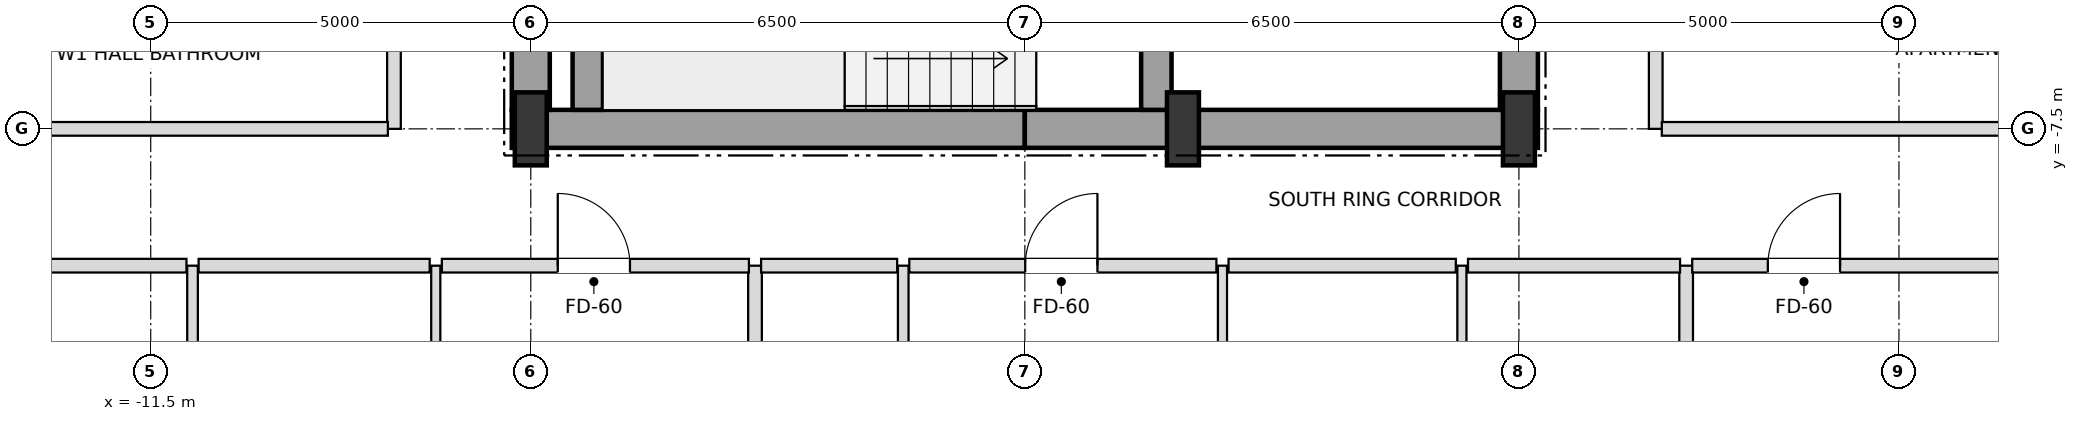
"""IFC4 building model, lengths in metres.
Left out: names, types, materials, properties, quantities, classifications, styles, units other than length and angle.
Written with IfcOpenShell. Run it as: python <this file> out.ifc"""

import sys

from ifc_helpers import new_model, si_unit, direction, frame, frame_2d, origin, origin_2d, place, context, subcontext, project, spatial, rectangle, i_section, extrude, element, fill, save


model = new_model("IFC4")
c1 = context("Model", 3, precision=1e-05, world=origin(), true_north=direction((0.0, 1.0)))
c2 = subcontext(c1, "Body", "Model", "MODEL_VIEW")
j1 = project(units=[si_unit("LENGTHUNIT", "METRE"), si_unit("PLANEANGLEUNIT", "RADIAN")], contexts=[c1])
p1 = place(None, origin())
s1 = spatial("IfcSite", under=j1, at=p1, CompositionType="ELEMENT")
p2 = place(p1, origin())
s2 = spatial("IfcBuilding", under=s1, at=p2, CompositionType="ELEMENT")
p3 = place(p2, frame((0.0, 0.0, 43.2)))
s3 = spatial("IfcBuildingStorey", under=s2, at=p3, CompositionType="ELEMENT", Elevation=43.2)
for number, where, z_axis, x_axis in (
    (1, (-6.5, -7.5, 0.0), (0.0, 0.0, 1.0), (1.0, 0.0, 0.0)),
    (2, (2.08, -7.5, 0.0), (0.0, 0.0, 1.0), (1.0, 0.0, 0.0)),
    (3, (6.5, -7.5, 0.0), (0.0, 0.0, 1.0), (1.0, 0.0, 0.0)),
):
    element("IfcColumn", number, at=place(p3, frame(where, z_axis=z_axis, x_axis=x_axis)), inside=s3, PredefinedType="COLUMN", context=c2, shape_type="SweptSolid", body=[
        extrude(i_section(OverallWidth=0.42, OverallDepth=0.96, WebThickness=0.022, FlangeThickness=0.034, at=origin_2d()), origin(), (0.0, 0.0, 1.0), 3.6),
    ])
for number, where, z_axis, x_axis in (
    (4, (-6.75, -7.5, 0.0), (0.0, 0.0, 1.0), (1.0, 0.0, 0.0)),
    (5, (0.0, -7.5, 0.0), (0.0, 0.0, 1.0), (1.0, 0.0, 0.0)),
):
    element("IfcWall", number, at=place(p3, frame(where, z_axis=z_axis, x_axis=x_axis)), inside=s3, PredefinedType="SHEAR", context=c2, shape_type="SweptSolid", body=[
        extrude(rectangle(XDim=6.75, YDim=0.5, at=frame_2d((3.375, 0.0))), origin(), (0.0, 0.0, 1.0), 3.38),
    ])
p4 = place(p3, frame((-6.5, -7.25, 0.0), z_axis=(0.0, 0.0, 1.0), x_axis=(0.0, 1.0, 0.0)))
e6 = element("IfcWall", 6, at=p4, inside=s3, PredefinedType="SHEAR", context=c2, shape_type="SweptSolid", body=[
    extrude(rectangle(XDim=3.55, YDim=0.5, at=frame_2d((1.775, 0.0))), origin(), (0.0, 0.0, 1.0), 3.38),
])
p5 = place(p3, frame((6.5, -7.25, 0.0), z_axis=(0.0, 0.0, 1.0), x_axis=(0.0, 1.0, 0.0)))
e7 = element("IfcWall", 7, at=p5, inside=s3, PredefinedType="SHEAR", context=c2, shape_type="SweptSolid", body=[
    extrude(rectangle(XDim=5.75, YDim=0.5, at=frame_2d((2.875, 0.0))), origin(), (0.0, 0.0, 1.0), 3.38),
])
p6 = place(p5, frame((0.85, 0.0, 0.0)))
e8 = element("IfcOpeningElement", 8, at=p6, cuts=e7, PredefinedType="OPENING", context=c2, shape_type="SweptSolid", body=[
    extrude(rectangle(XDim=1.05, YDim=2.15, at=frame_2d((0.525, 1.075))), frame((0.0, 0.26, 0.0), z_axis=(0.0, -1.0, 0.0), x_axis=(1.0, 0.0, 0.0)), (0.0, 0.0, 1.0), 0.52),
])
p7 = place(p3, frame((-5.75, -7.25, 0.0), z_axis=(0.0, 0.0, 1.0), x_axis=(0.0, 1.0, 0.0)))
e9 = element("IfcWall", 9, at=p7, inside=s3, PredefinedType="SHEAR", context=c2, shape_type="SweptSolid", body=[
    extrude(rectangle(XDim=2.9, YDim=0.4, at=frame_2d((1.45, 0.0))), origin(), (0.0, 0.0, 1.0), 3.38),
])
p8 = place(p3, frame((1.73, -7.25, 0.0), z_axis=(0.0, 0.0, 1.0), x_axis=(0.0, 1.0, 0.0)))
e10 = element("IfcWall", 10, at=p8, inside=s3, PredefinedType="SHEAR", context=c2, shape_type="SweptSolid", body=[
    extrude(rectangle(XDim=3.3, YDim=0.4, at=frame_2d((1.65, 0.0))), origin(), (0.0, 0.0, 1.0), 3.38),
])
p9 = place(p8, frame((0.9, 0.0, 0.0)))
e11 = element("IfcOpeningElement", 11, at=p9, cuts=e10, PredefinedType="OPENING", context=c2, shape_type="SweptSolid", body=[
    extrude(rectangle(XDim=1.05, YDim=2.15, at=frame_2d((0.525, 1.075))), frame((0.0, 0.21, 0.0), z_axis=(0.0, -1.0, 0.0), x_axis=(1.0, 0.0, 0.0)), (0.0, 0.0, 1.0), 0.42),
])
p10 = place(p3, frame((-10.95, -18.9, 0.0), z_axis=(0.0, 0.0, 1.0), x_axis=(0.0, 1.0, 0.0)))
e12 = element("IfcWall", 12, at=p10, inside=s3, PredefinedType="PARTITIONING", context=c2, shape_type="SweptSolid", body=[
    extrude(rectangle(XDim=9.6, YDim=0.14, at=frame_2d((4.8, 0.0))), origin(), (0.0, 0.0, 1.0), 2.816),
])
p11 = place(p10, frame((4.35, 0.0, 0.0)))
e13 = element("IfcOpeningElement", 13, at=p11, cuts=e12, PredefinedType="OPENING", context=c2, shape_type="SweptSolid", body=[
    extrude(rectangle(XDim=0.9, YDim=2.1, at=frame_2d((0.45, 1.05))), frame((0.0, 0.08, 0.0), z_axis=(0.0, -1.0, 0.0), x_axis=(1.0, 0.0, 0.0)), (0.0, 0.0, 1.0), 0.16),
])
p12 = place(p3, frame((-8.3, -7.5, 0.0), z_axis=(0.0, 0.0, 1.0), x_axis=(0.0, 1.0, 0.0)))
e14 = element("IfcWall", 14, at=p12, inside=s3, PredefinedType="PARTITIONING", context=c2, shape_type="SweptSolid", body=[
    extrude(rectangle(XDim=15.0, YDim=0.18, at=frame_2d((7.5, 0.0))), origin(), (0.0, 0.0, 1.0), 3.38),
])
p13 = place(p12, frame((3.475, 0.0, 0.0)))
e15 = element("IfcOpeningElement", 15, at=p13, cuts=e14, PredefinedType="OPENING", context=c2, shape_type="SweptSolid", body=[
    extrude(rectangle(XDim=0.95, YDim=2.15, at=frame_2d((0.475, 1.075))), frame((0.0, 0.1, 0.0), z_axis=(0.0, -1.0, 0.0), x_axis=(1.0, 0.0, 0.0)), (0.0, 0.0, 1.0), 0.2),
])
p14 = place(p3, frame((-7.75, -18.9, 0.0), z_axis=(0.0, 0.0, 1.0), x_axis=(0.0, 1.0, 0.0)))
e16 = element("IfcWall", 16, at=p14, inside=s3, PredefinedType="PARTITIONING", context=c2, shape_type="SweptSolid", body=[
    extrude(rectangle(XDim=9.6, YDim=0.12, at=frame_2d((4.8, 0.0))), origin(), (0.0, 0.0, 1.0), 2.816),
])
p15 = place(p14, frame((4.325, 0.0, 0.0)))
e17 = element("IfcOpeningElement", 17, at=p15, cuts=e16, PredefinedType="OPENING", context=c2, shape_type="SweptSolid", body=[
    extrude(rectangle(XDim=0.95, YDim=2.1, at=frame_2d((0.475, 1.05))), frame((0.0, 0.07, 0.0), z_axis=(0.0, -1.0, 0.0), x_axis=(1.0, 0.0, 0.0)), (0.0, 0.0, 1.0), 0.14),
])
p16 = place(p3, frame((-3.55, -24.9, 0.0), z_axis=(0.0, 0.0, 1.0), x_axis=(0.0, 1.0, 0.0)))
e18 = element("IfcWall", 18, at=p16, inside=s3, PredefinedType="PARTITIONING", context=c2, shape_type="SweptSolid", body=[
    extrude(rectangle(XDim=15.6, YDim=0.18, at=frame_2d((7.8, 0.0))), origin(), (0.0, 0.0, 1.0), 2.816),
])
p17 = place(p3, frame((-1.6, -18.9, 0.0), z_axis=(0.0, 0.0, 1.0), x_axis=(0.0, 1.0, 0.0)))
e19 = element("IfcWall", 19, at=p17, inside=s3, PredefinedType="PARTITIONING", context=c2, shape_type="SweptSolid", body=[
    extrude(rectangle(XDim=9.6, YDim=0.14, at=frame_2d((4.8, 0.0))), origin(), (0.0, 0.0, 1.0), 2.948),
])
p18 = place(p17, frame((4.35, 0.0, 0.0)))
e20 = element("IfcOpeningElement", 20, at=p18, cuts=e19, PredefinedType="OPENING", context=c2, shape_type="SweptSolid", body=[
    extrude(rectangle(XDim=0.9, YDim=2.1, at=frame_2d((0.45, 1.05))), frame((0.0, 0.08, 0.0), z_axis=(0.0, -1.0, 0.0), x_axis=(1.0, 0.0, 0.0)), (0.0, 0.0, 1.0), 0.16),
])
p19 = place(p3, frame((2.6, -24.9, 0.0), z_axis=(0.0, 0.0, 1.0), x_axis=(0.0, 1.0, 0.0)))
e21 = element("IfcWall", 21, at=p19, inside=s3, PredefinedType="PARTITIONING", context=c2, shape_type="SweptSolid", body=[
    extrude(rectangle(XDim=15.6, YDim=0.12, at=frame_2d((7.8, 0.0))), origin(), (0.0, 0.0, 1.0), 2.816),
])
p20 = place(p19, frame((10.325, 0.0, 0.0)))
e22 = element("IfcOpeningElement", 22, at=p20, cuts=e21, PredefinedType="OPENING", context=c2, shape_type="SweptSolid", body=[
    extrude(rectangle(XDim=0.95, YDim=2.1, at=frame_2d((0.475, 1.05))), frame((0.0, 0.07, 0.0), z_axis=(0.0, -1.0, 0.0), x_axis=(1.0, 0.0, 0.0)), (0.0, 0.0, 1.0), 0.14),
])
p21 = place(p19, frame((2.55, 0.0, 0.0)))
e23 = element("IfcOpeningElement", 23, at=p21, cuts=e21, PredefinedType="OPENING", context=c2, shape_type="SweptSolid", body=[
    extrude(rectangle(XDim=0.9, YDim=2.1, at=frame_2d((0.45, 1.05))), frame((0.0, 0.07, 0.0), z_axis=(0.0, -1.0, 0.0), x_axis=(1.0, 0.0, 0.0)), (0.0, 0.0, 1.0), 0.14),
])
p22 = place(p3, frame((5.75, -24.9, 0.0), z_axis=(0.0, 0.0, 1.0), x_axis=(0.0, 1.0, 0.0)))
e24 = element("IfcWall", 24, at=p22, inside=s3, PredefinedType="PARTITIONING", context=c2, shape_type="SweptSolid", body=[
    extrude(rectangle(XDim=15.6, YDim=0.12, at=frame_2d((7.8, 0.0))), origin(), (0.0, 0.0, 1.0), 2.816),
])
p23 = place(p22, frame((10.35, 0.0, 0.0)))
e25 = element("IfcOpeningElement", 25, at=p23, cuts=e24, PredefinedType="OPENING", context=c2, shape_type="SweptSolid", body=[
    extrude(rectangle(XDim=0.9, YDim=2.1, at=frame_2d((0.45, 1.05))), frame((0.0, 0.07, 0.0), z_axis=(0.0, -1.0, 0.0), x_axis=(1.0, 0.0, 0.0)), (0.0, 0.0, 1.0), 0.14),
])
p24 = place(p22, frame((2.55, 0.0, 0.0)))
e26 = element("IfcOpeningElement", 26, at=p24, cuts=e24, PredefinedType="OPENING", context=c2, shape_type="SweptSolid", body=[
    extrude(rectangle(XDim=0.9, YDim=2.1, at=frame_2d((0.45, 1.05))), frame((0.0, 0.07, 0.0), z_axis=(0.0, -1.0, 0.0), x_axis=(1.0, 0.0, 0.0)), (0.0, 0.0, 1.0), 0.14),
])
p25 = place(p3, frame((8.3, -7.5, 0.0), z_axis=(0.0, 0.0, 1.0), x_axis=(0.0, 1.0, 0.0)))
e27 = element("IfcWall", 27, at=p25, inside=s3, PredefinedType="PARTITIONING", context=c2, shape_type="SweptSolid", body=[
    extrude(rectangle(XDim=15.0, YDim=0.18, at=frame_2d((7.5, 0.0))), origin(), (0.0, 0.0, 1.0), 3.38),
])
p26 = place(p25, frame((3.475, 0.0, 0.0)))
e28 = element("IfcOpeningElement", 28, at=p26, cuts=e27, PredefinedType="OPENING", context=c2, shape_type="SweptSolid", body=[
    extrude(rectangle(XDim=0.95, YDim=2.15, at=frame_2d((0.475, 1.075))), frame((0.0, 0.1, 0.0), z_axis=(0.0, -1.0, 0.0), x_axis=(1.0, 0.0, 0.0)), (0.0, 0.0, 1.0), 0.2),
])
p27 = place(p3, frame((8.7, -24.9, 0.0), z_axis=(0.0, 0.0, 1.0), x_axis=(0.0, 1.0, 0.0)))
e29 = element("IfcWall", 29, at=p27, inside=s3, PredefinedType="PARTITIONING", context=c2, shape_type="SweptSolid", body=[
    extrude(rectangle(XDim=15.6, YDim=0.18, at=frame_2d((7.8, 0.0))), origin(), (0.0, 0.0, 1.0), 2.816),
])
p28 = place(p3, frame((-12.82, -9.3, 0.0), z_axis=(0.0, 0.0, 1.0), x_axis=(1.0, 0.0, 0.0)))
e30 = element("IfcWall", 30, at=p28, inside=s3, PredefinedType="PARTITIONING", context=c2, shape_type="SweptSolid", body=[
    extrude(rectangle(XDim=1.79, YDim=0.18, at=frame_2d((0.895, 0.0))), origin(), (0.0, 0.0, 1.0), 3.38),
])
p29 = place(p3, frame((-10.87, -9.3, 0.0), z_axis=(0.0, 0.0, 1.0), x_axis=(1.0, 0.0, 0.0)))
e31 = element("IfcWall", 31, at=p29, inside=s3, PredefinedType="PARTITIONING", context=c2, shape_type="SweptSolid", body=[
    extrude(rectangle(XDim=3.04, YDim=0.18, at=frame_2d((1.52, 0.0))), origin(), (0.0, 0.0, 1.0), 3.38),
])
p30 = place(p3, frame((-7.67, -9.3, 0.0), z_axis=(0.0, 0.0, 1.0), x_axis=(1.0, 0.0, 0.0)))
e32 = element("IfcWall", 32, at=p30, inside=s3, PredefinedType="PARTITIONING", context=c2, shape_type="SweptSolid", body=[
    extrude(rectangle(XDim=4.04, YDim=0.18, at=frame_2d((2.02, 0.0))), origin(), (0.0, 0.0, 1.0), 2.816),
])
p31 = place(p30, frame((1.525, 0.0, 0.0)))
e33 = element("IfcOpeningElement", 33, at=p31, cuts=e32, PredefinedType="OPENING", context=c2, shape_type="SweptSolid", body=[
    extrude(rectangle(XDim=0.95, YDim=2.15, at=frame_2d((0.475, 1.075))), frame((0.0, 0.1, 0.0), z_axis=(0.0, -1.0, 0.0), x_axis=(1.0, 0.0, 0.0)), (0.0, 0.0, 1.0), 0.2),
])
p32 = place(p3, frame((-3.47, -9.3, 0.0), z_axis=(0.0, 0.0, 1.0), x_axis=(1.0, 0.0, 0.0)))
e34 = element("IfcWall", 34, at=p32, inside=s3, PredefinedType="PARTITIONING", context=c2, shape_type="SweptSolid", body=[
    extrude(rectangle(XDim=1.79, YDim=0.18, at=frame_2d((0.895, 0.0))), origin(), (0.0, 0.0, 1.0), 3.38),
])
p33 = place(p3, frame((-1.52, -9.3, 0.0), z_axis=(0.0, 0.0, 1.0), x_axis=(1.0, 0.0, 0.0)))
e35 = element("IfcWall", 35, at=p33, inside=s3, PredefinedType="PARTITIONING", context=c2, shape_type="SweptSolid", body=[
    extrude(rectangle(XDim=4.04, YDim=0.18, at=frame_2d((2.02, 0.0))), origin(), (0.0, 0.0, 1.0), 3.38),
])
p34 = place(p33, frame((1.525, 0.0, 0.0)))
e36 = element("IfcOpeningElement", 36, at=p34, cuts=e35, PredefinedType="OPENING", context=c2, shape_type="SweptSolid", body=[
    extrude(rectangle(XDim=0.95, YDim=2.15, at=frame_2d((0.475, 1.075))), frame((0.0, 0.1, 0.0), z_axis=(0.0, -1.0, 0.0), x_axis=(1.0, 0.0, 0.0)), (0.0, 0.0, 1.0), 0.2),
])
p35 = place(p3, frame((2.68, -9.3, 0.0), z_axis=(0.0, 0.0, 1.0), x_axis=(1.0, 0.0, 0.0)))
e37 = element("IfcWall", 37, at=p35, inside=s3, PredefinedType="PARTITIONING", context=c2, shape_type="SweptSolid", body=[
    extrude(rectangle(XDim=2.99, YDim=0.18, at=frame_2d((1.495, 0.0))), origin(), (0.0, 0.0, 1.0), 3.38),
])
p36 = place(p3, frame((5.83, -9.3, 0.0), z_axis=(0.0, 0.0, 1.0), x_axis=(1.0, 0.0, 0.0)))
e38 = element("IfcWall", 38, at=p36, inside=s3, PredefinedType="PARTITIONING", context=c2, shape_type="SweptSolid", body=[
    extrude(rectangle(XDim=2.79, YDim=0.18, at=frame_2d((1.395, 0.0))), origin(), (0.0, 0.0, 1.0), 2.816),
])
p37 = place(p3, frame((8.78, -9.3, 0.0), z_axis=(0.0, 0.0, 1.0), x_axis=(1.0, 0.0, 0.0)))
e39 = element("IfcWall", 39, at=p37, inside=s3, PredefinedType="PARTITIONING", context=c2, shape_type="SweptSolid", body=[
    extrude(rectangle(XDim=5.19, YDim=0.18, at=frame_2d((2.595, 0.0))), origin(), (0.0, 0.0, 1.0), 3.38),
])
p38 = place(p37, frame((0.995, 0.0, 0.0)))
e40 = element("IfcOpeningElement", 40, at=p38, cuts=e39, PredefinedType="OPENING", context=c2, shape_type="SweptSolid", body=[
    extrude(rectangle(XDim=0.95, YDim=2.15, at=frame_2d((0.475, 1.075))), frame((0.0, 0.1, 0.0), z_axis=(0.0, -1.0, 0.0), x_axis=(1.0, 0.0, 0.0)), (0.0, 0.0, 1.0), 0.2),
])
for number, where, z_axis, x_axis in (
    (41, (-16.02, -7.5, 0.0), (0.0, 0.0, 1.0), (1.0, 0.0, 0.0)),
    (42, (8.38, -7.5, 0.0), (0.0, 0.0, 1.0), (1.0, 0.0, 0.0)),
):
    element("IfcWall", number, at=place(p3, frame(where, z_axis=z_axis, x_axis=x_axis)), inside=s3, PredefinedType="PARTITIONING", context=c2, shape_type="SweptSolid", body=[
        extrude(rectangle(XDim=7.64, YDim=0.18, at=frame_2d((3.82, 0.0))), origin(), (0.0, 0.0, 1.0), 2.816),
    ])
p39 = place(p31, origin())
e43 = element("IfcDoor", 43, at=p39, inside=s3, OperationType="SINGLE_SWING_LEFT", PredefinedType="DOOR", context=c2, shape_type="SweptSolid", body=[
    extrude(rectangle(XDim=0.95, YDim=2.15, at=frame_2d((0.475, 1.075))), frame((0.0, 0.025, 0.0), z_axis=(0.0, -1.0, 0.0), x_axis=(1.0, 0.0, 0.0)), (0.0, 0.0, 1.0), 0.05),
])
fill(e33, e43)
p40 = place(p34, origin())
e44 = element("IfcDoor", 44, at=p40, inside=s3, OperationType="SINGLE_SWING_RIGHT", PredefinedType="DOOR", context=c2, shape_type="SweptSolid", body=[
    extrude(rectangle(XDim=0.95, YDim=2.15, at=frame_2d((0.475, 1.075))), frame((0.0, 0.025, 0.0), z_axis=(0.0, -1.0, 0.0), x_axis=(1.0, 0.0, 0.0)), (0.0, 0.0, 1.0), 0.05),
])
fill(e36, e44)
p41 = place(p38, origin())
e45 = element("IfcDoor", 45, at=p41, inside=s3, OperationType="SINGLE_SWING_RIGHT", PredefinedType="DOOR", context=c2, shape_type="SweptSolid", body=[
    extrude(rectangle(XDim=0.95, YDim=2.15, at=frame_2d((0.475, 1.075))), frame((0.0, 0.025, 0.0), z_axis=(0.0, -1.0, 0.0), x_axis=(1.0, 0.0, 0.0)), (0.0, 0.0, 1.0), 0.05),
])
fill(e40, e45)
save(model, sys.argv[1])
